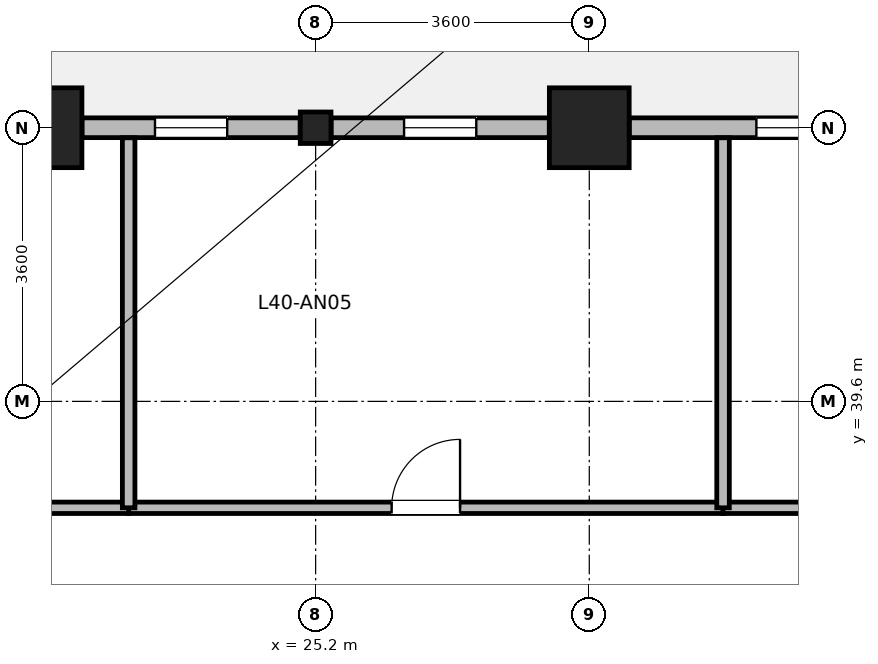
"""IFC4 building model, lengths in metres.
Left out: names, types, materials, properties, quantities, classifications, styles, units other than length and angle.
Written with IfcOpenShell. Run it as: python <this file> out.ifc"""

import sys

from ifc_helpers import new_model, si_unit, direction, frame, frame_2d, origin, origin_2d, place, context, subcontext, project, spatial, rectangle, i_section, extrude, source, transform, mapped, element, fill, save


model = new_model("IFC4")
c1 = context("Model", 3, precision=1e-05, world=origin(), true_north=direction((0.0, 1.0)))
c2 = subcontext(c1, "Body", "Model", "MODEL_VIEW")
j1 = project(units=[si_unit("LENGTHUNIT", "METRE"), si_unit("PLANEANGLEUNIT", "RADIAN")], contexts=[c1])
p1 = place(None, origin())
s1 = spatial("IfcSite", under=j1, at=p1, CompositionType="ELEMENT")
p2 = place(p1, origin())
s2 = spatial("IfcBuilding", under=s1, at=p2, CompositionType="ELEMENT")
p3 = place(p2, frame((0.0, 0.0, 158.7)))
s3 = spatial("IfcBuildingStorey", under=s2, at=p3, CompositionType="ELEMENT", Elevation=158.7)
m1 = source(origin(), c2, "Body", "SweptSolid", [
    extrude(rectangle(XDim=1.05, YDim=1.05, at=origin_2d()), origin(), (0.0, 0.0, 1.0), 3.7),
])
for number, where, z_axis, x_axis in (
    (1, (21.6, 43.2, 0.0), (0.0, 0.0, 1.0), (1.0, 0.0, 0.0)),
    (2, (28.8, 43.2, 0.0), (0.0, 0.0, 1.0), (1.0, 0.0, 0.0)),
):
    element("IfcColumn", number, at=place(p3, frame(where, z_axis=z_axis, x_axis=x_axis)), inside=s3, PredefinedType="COLUMN", context=c2, shape_type="MappedRepresentation", body=[
        mapped(m1, transform((0.0, 0.0, 0.0), x_axis=(1.0, 0.0, 0.0), y_axis=(0.0, 1.0, 0.0), z_axis=(0.0, 0.0, 1.0), scale=1.0)),
    ])
m2 = source(origin(), c2, "Body", "SweptSolid", [
    extrude(i_section(OverallWidth=0.404, OverallDepth=0.414, WebThickness=0.021, FlangeThickness=0.028, FilletRadius=0.015, at=origin_2d()), origin(), (0.0, 0.0, 1.0), 3.7),
])
p4 = place(p3, frame((25.2, 43.2, 0.0), z_axis=(0.0, 0.0, 1.0), x_axis=(1.0, 0.0, 0.0)))
e3 = element("IfcColumn", 3, at=p4, inside=s3, PredefinedType="COLUMN", context=c2, shape_type="MappedRepresentation", body=[
    mapped(m2, transform((0.0, 0.0, 0.0), x_axis=(1.0, 0.0, 0.0), y_axis=(0.0, 1.0, 0.0), z_axis=(0.0, 0.0, 1.0), scale=1.0)),
])
p5 = place(p3, frame((29.326, 43.2, 0.0), z_axis=(0.0, 0.0, 1.0), x_axis=(1.0, 0.0, 0.0)))
e4 = element("IfcWall", 4, at=p5, inside=s3, PredefinedType="STANDARD", context=c2, shape_type="SweptSolid", body=[
    extrude(rectangle(XDim=2.871, YDim=0.26, at=frame_2d((1.436, 0.0))), origin(), (0.0, 0.0, 1.0), 2.99),
])
p6 = place(p5, frame((1.673, 0.0, 0.85)))
e5 = element("IfcOpeningElement", 5, at=p6, cuts=e4, PredefinedType="OPENING", context=c2, shape_type="SweptSolid", body=[
    extrude(rectangle(XDim=0.95, YDim=1.75, at=frame_2d((0.475, 0.875))), frame((0.0, 0.14, 0.0), z_axis=(0.0, -1.0, 0.0), x_axis=(1.0, 0.0, 0.0)), (0.0, 0.0, 1.0), 0.28),
])
p7 = place(p3, frame((25.403, 43.2, 0.0), z_axis=(0.0, 0.0, 1.0), x_axis=(1.0, 0.0, 0.0)))
e6 = element("IfcWall", 6, at=p7, inside=s3, PredefinedType="STANDARD", context=c2, shape_type="SweptSolid", body=[
    extrude(rectangle(XDim=2.871, YDim=0.26, at=frame_2d((1.436, 0.0))), origin(), (0.0, 0.0, 1.0), 2.99),
])
p8 = place(p7, frame((0.96, 0.0, 0.85)))
e7 = element("IfcOpeningElement", 7, at=p8, cuts=e6, PredefinedType="OPENING", context=c2, shape_type="SweptSolid", body=[
    extrude(rectangle(XDim=0.95, YDim=1.75, at=frame_2d((0.475, 0.875))), frame((0.0, 0.14, 0.0), z_axis=(0.0, -1.0, 0.0), x_axis=(1.0, 0.0, 0.0)), (0.0, 0.0, 1.0), 0.28),
])
p9 = place(p3, frame((22.126, 43.2, 0.0), z_axis=(0.0, 0.0, 1.0), x_axis=(1.0, 0.0, 0.0)))
e8 = element("IfcWall", 8, at=p9, inside=s3, PredefinedType="STANDARD", context=c2, shape_type="SweptSolid", body=[
    extrude(rectangle(XDim=2.871, YDim=0.26, at=frame_2d((1.436, 0.0))), origin(), (0.0, 0.0, 1.0), 2.99),
])
p10 = place(p9, frame((0.96, 0.0, 0.85)))
e9 = element("IfcOpeningElement", 9, at=p10, cuts=e8, PredefinedType="OPENING", context=c2, shape_type="SweptSolid", body=[
    extrude(rectangle(XDim=0.95, YDim=1.75, at=frame_2d((0.475, 0.875))), frame((0.0, 0.14, 0.0), z_axis=(0.0, -1.0, 0.0), x_axis=(1.0, 0.0, 0.0)), (0.0, 0.0, 1.0), 0.28),
])
p11 = place(p3, frame((22.74, 38.2, 0.0), z_axis=(0.0, 0.0, 1.0), x_axis=(1.0, 0.0, 0.0)))
e10 = element("IfcWall", 10, at=p11, inside=s3, PredefinedType="PARTITIONING", context=c2, shape_type="SweptSolid", body=[
    extrude(rectangle(XDim=7.82, YDim=0.15, at=frame_2d((3.91, 0.0))), origin(), (0.0, 0.0, 1.0), 3.44),
])
p12 = place(p11, frame((3.46, 0.0, 0.0)))
e11 = element("IfcOpeningElement", 11, at=p12, cuts=e10, PredefinedType="OPENING", context=c2, shape_type="SweptSolid", body=[
    extrude(rectangle(XDim=0.9, YDim=2.08, at=frame_2d((0.45, 1.04))), frame((0.0, 0.085, 0.0), z_axis=(0.0, -1.0, 0.0), x_axis=(1.0, 0.0, 0.0)), (0.0, 0.0, 1.0), 0.17),
])
p13 = place(p3, frame((15.92, 38.2, 0.0), z_axis=(0.0, 0.0, 1.0), x_axis=(1.0, 0.0, 0.0)))
e12 = element("IfcWall", 12, at=p13, inside=s3, PredefinedType="PARTITIONING", context=c2, shape_type="SweptSolid", body=[
    extrude(rectangle(XDim=6.82, YDim=0.15, at=frame_2d((3.41, 0.0))), origin(), (0.0, 0.0, 1.0), 3.44),
])
p14 = place(p13, frame((2.76, 0.0, 0.0)))
e13 = element("IfcOpeningElement", 13, at=p14, cuts=e12, PredefinedType="OPENING", context=c2, shape_type="SweptSolid", body=[
    extrude(rectangle(XDim=1.3, YDim=2.12, at=frame_2d((0.65, 1.06))), frame((0.0, 0.085, 0.0), z_axis=(0.0, -1.0, 0.0), x_axis=(1.0, 0.0, 0.0)), (0.0, 0.0, 1.0), 0.17),
])
p15 = place(p3, frame((30.56, 38.2, 0.0), z_axis=(0.0, 0.0, 1.0), x_axis=(1.0, 0.0, 0.0)))
e14 = element("IfcWall", 14, at=p15, inside=s3, PredefinedType="PARTITIONING", context=c2, shape_type="SweptSolid", body=[
    extrude(rectangle(XDim=4.8, YDim=0.15, at=frame_2d((2.4, 0.0))), origin(), (0.0, 0.0, 1.0), 3.44),
])
p16 = place(p15, frame((1.75, 0.0, 0.0)))
e15 = element("IfcOpeningElement", 15, at=p16, cuts=e14, PredefinedType="OPENING", context=c2, shape_type="SweptSolid", body=[
    extrude(rectangle(XDim=1.3, YDim=2.12, at=frame_2d((0.65, 1.06))), frame((0.0, 0.085, 0.0), z_axis=(0.0, -1.0, 0.0), x_axis=(1.0, 0.0, 0.0)), (0.0, 0.0, 1.0), 0.17),
])
for number, where, z_axis, x_axis in (
    (16, (22.74, 38.2, 0.0), (0.0, 0.0, 1.0), (0.0, 1.0, 0.0)),
    (17, (30.56, 38.2, 0.0), (0.0, 0.0, 1.0), (0.0, 1.0, 0.0)),
):
    element("IfcWall", number, at=place(p3, frame(where, z_axis=z_axis, x_axis=x_axis)), inside=s3, PredefinedType="PARTITIONING", context=c2, shape_type="SweptSolid", body=[
        extrude(rectangle(XDim=4.868, YDim=0.165, at=frame_2d((2.434, 0.0))), origin(), (0.0, 0.0, 1.0), 3.44),
    ])
p17 = place(p6, origin())
e18 = element("IfcWindow", 18, at=p17, inside=s3, PartitioningType="SINGLE_PANEL", PredefinedType="WINDOW", context=c2, shape_type="SweptSolid", body=[
    extrude(rectangle(XDim=0.95, YDim=1.75, at=frame_2d((0.475, 0.875))), frame((0.0, 0.03, 0.0), z_axis=(0.0, -1.0, 0.0), x_axis=(1.0, 0.0, 0.0)), (0.0, 0.0, 1.0), 0.06),
])
fill(e5, e18)
p18 = place(p8, origin())
e19 = element("IfcWindow", 19, at=p18, inside=s3, PartitioningType="SINGLE_PANEL", PredefinedType="WINDOW", context=c2, shape_type="SweptSolid", body=[
    extrude(rectangle(XDim=0.95, YDim=1.75, at=frame_2d((0.475, 0.875))), frame((0.0, 0.03, 0.0), z_axis=(0.0, -1.0, 0.0), x_axis=(1.0, 0.0, 0.0)), (0.0, 0.0, 1.0), 0.06),
])
fill(e7, e19)
p19 = place(p10, origin())
e20 = element("IfcWindow", 20, at=p19, inside=s3, PartitioningType="SINGLE_PANEL", PredefinedType="WINDOW", context=c2, shape_type="SweptSolid", body=[
    extrude(rectangle(XDim=0.95, YDim=1.75, at=frame_2d((0.475, 0.875))), frame((0.0, 0.03, 0.0), z_axis=(0.0, -1.0, 0.0), x_axis=(1.0, 0.0, 0.0)), (0.0, 0.0, 1.0), 0.06),
])
fill(e9, e20)
p20 = place(p12, origin())
e21 = element("IfcDoor", 21, at=p20, inside=s3, OperationType="SINGLE_SWING_RIGHT", PredefinedType="DOOR", context=c2, shape_type="SweptSolid", body=[
    extrude(rectangle(XDim=0.9, YDim=2.08, at=frame_2d((0.45, 1.04))), frame((0.0, 0.025, 0.0), z_axis=(0.0, -1.0, 0.0), x_axis=(1.0, 0.0, 0.0)), (0.0, 0.0, 1.0), 0.05),
])
fill(e11, e21)
save(model, sys.argv[1])
